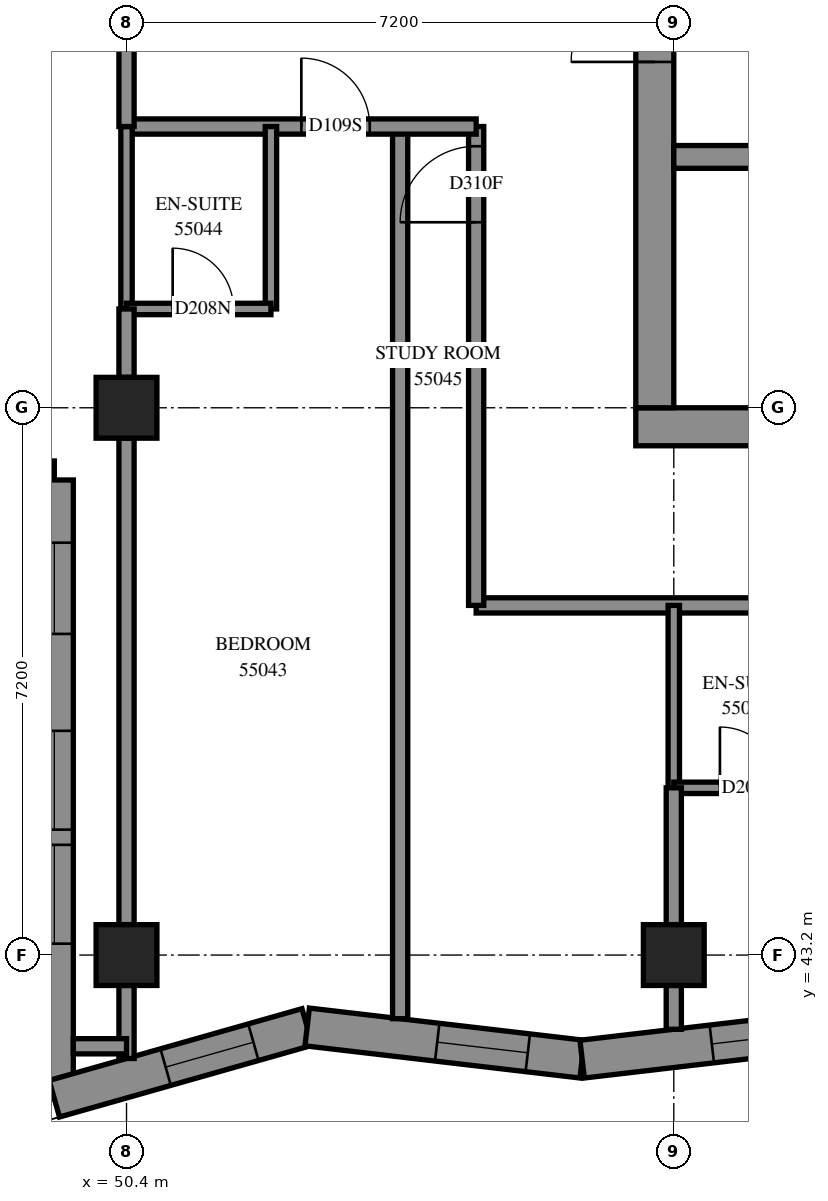
"""IFC4 building model, lengths in metres.
Left out: names, types, materials, properties, quantities, classifications, styles, units other than length and angle.
Written with IfcOpenShell. Run it as: python <this file> out.ifc"""

import sys

from ifc_helpers import new_model, si_unit, direction, frame, frame_2d, origin, origin_2d, place, context, subcontext, project, spatial, polyline, rectangle, outline, extrude, element, fill, save


model = new_model("IFC4")
c1 = context("Model", 3, precision=1e-05, world=origin(), true_north=direction((0.0, 1.0)))
c2 = subcontext(c1, "Body", "Model", "MODEL_VIEW")
j1 = project(units=[si_unit("LENGTHUNIT", "METRE"), si_unit("PLANEANGLEUNIT", "RADIAN")], contexts=[c1])
p1 = place(None, origin())
s1 = spatial("IfcSite", under=j1, at=p1, CompositionType="ELEMENT")
p2 = place(p1, origin())
s2 = spatial("IfcBuilding", under=s1, at=p2, CompositionType="ELEMENT")
p3 = place(p2, frame((0.0, 0.0, 203.2)))
s3 = spatial("IfcBuildingStorey", under=s2, at=p3, CompositionType="ELEMENT", Elevation=203.2)
for number, where, z_axis, x_axis in (
    (1, (50.4, 43.2, 0.0), (0.0, 0.0, 1.0), (1.0, 0.0, 0.0)),
    (2, (50.4, 50.4, 0.0), (0.0, 0.0, 1.0), (1.0, 0.0, 0.0)),
    (3, (57.6, 43.2, 0.0), (0.0, 0.0, 1.0), (1.0, 0.0, 0.0)),
):
    element("IfcColumn", number, at=place(p3, frame(where, z_axis=z_axis, x_axis=x_axis)), inside=s3, PredefinedType="COLUMN", context=c2, shape_type="SweptSolid", body=[
        extrude(rectangle(XDim=0.8, YDim=0.8, at=origin_2d()), origin(), (0.0, 0.0, 1.0), 3.1),
    ])
p4 = place(p3, frame((57.1, 50.15, -0.3), z_axis=(0.0, 0.0, 1.0), x_axis=(1.0, 0.0, 0.0)))
e4 = element("IfcWall", 4, at=p4, inside=s3, PredefinedType="SHEAR", context=c2, shape_type="SweptSolid", body=[
    extrude(rectangle(XDim=15.4, YDim=0.5, at=frame_2d((7.7, 0.0))), origin(), (0.0, 0.0, 1.0), 2.7),
])
p5 = place(p3, frame((57.35, 50.4, -0.3), z_axis=(0.0, 0.0, 1.0), x_axis=(0.0, 1.0, 0.0)))
e5 = element("IfcWall", 5, at=p5, inside=s3, PredefinedType="SHEAR", context=c2, shape_type="SweptSolid", body=[
    extrude(rectangle(XDim=14.4, YDim=0.5, at=frame_2d((7.2, 0.0))), origin(), (0.0, 0.0, 1.0), 2.7),
])
p6 = place(p5, frame((4.55, 0.0, 0.3)))
e6 = element("IfcOpeningElement", 6, at=p6, cuts=e5, PredefinedType="OPENING", context=c2, shape_type="SweptSolid", body=[
    extrude(rectangle(XDim=1.1, YDim=2.1, at=frame_2d((0.55, 1.05))), frame((0.0, 0.26, 0.0), z_axis=(0.0, -1.0, 0.0), x_axis=(1.0, 0.0, 0.0)), (0.0, 0.0, 1.0), 0.52),
])
p7 = place(p5, frame((11.35, 0.0, 0.3)))
e7 = element("IfcOpeningElement", 7, at=p7, cuts=e5, PredefinedType="OPENING", context=c2, shape_type="SweptSolid", body=[
    extrude(rectangle(XDim=1.1, YDim=2.1, at=frame_2d((0.55, 1.05))), frame((0.0, 0.26, 0.0), z_axis=(0.0, -1.0, 0.0), x_axis=(1.0, 0.0, 0.0)), (0.0, 0.0, 1.0), 0.52),
])
p8 = place(p3, frame((57.6, 53.7, 0.0), z_axis=(0.0, 0.0, 1.0), x_axis=(1.0, 0.0, 0.0)))
e8 = element("IfcWall", 8, at=p8, inside=s3, PredefinedType="SOLIDWALL", context=c2, shape_type="SweptSolid", body=[
    extrude(rectangle(XDim=14.4, YDim=0.3, at=frame_2d((7.2, 0.0))), origin(), (0.0, 0.0, 1.0), 3.1),
])
p9 = place(p8, frame((1.35, 0.0, 0.0)))
e9 = element("IfcOpeningElement", 9, at=p9, cuts=e8, PredefinedType="OPENING", context=c2, shape_type="SweptSolid", body=[
    extrude(rectangle(XDim=0.9, YDim=2.1, at=frame_2d((0.45, 1.05))), frame((0.0, 0.16, 0.0), z_axis=(0.0, -1.0, 0.0), x_axis=(1.0, 0.0, 0.0)), (0.0, 0.0, 1.0), 0.32),
])
p10 = place(p8, frame((4.95, 0.0, 0.0)))
e10 = element("IfcOpeningElement", 10, at=p10, cuts=e8, PredefinedType="OPENING", context=c2, shape_type="SweptSolid", body=[
    extrude(rectangle(XDim=0.9, YDim=2.1, at=frame_2d((0.45, 1.05))), frame((0.0, 0.16, 0.0), z_axis=(0.0, -1.0, 0.0), x_axis=(1.0, 0.0, 0.0)), (0.0, 0.0, 1.0), 0.32),
])
p11 = place(p8, frame((8.55, 0.0, 0.0)))
e11 = element("IfcOpeningElement", 11, at=p11, cuts=e8, PredefinedType="OPENING", context=c2, shape_type="SweptSolid", body=[
    extrude(rectangle(XDim=0.9, YDim=2.1, at=frame_2d((0.45, 1.05))), frame((0.0, 0.16, 0.0), z_axis=(0.0, -1.0, 0.0), x_axis=(1.0, 0.0, 0.0)), (0.0, 0.0, 1.0), 0.32),
])
p12 = place(p8, frame((12.05, 0.0, 0.0)))
e12 = element("IfcOpeningElement", 12, at=p12, cuts=e8, PredefinedType="OPENING", context=c2, shape_type="SweptSolid", body=[
    extrude(rectangle(XDim=1.1, YDim=2.1, at=frame_2d((0.55, 1.05))), frame((0.0, 0.16, 0.0), z_axis=(0.0, -1.0, 0.0), x_axis=(1.0, 0.0, 0.0)), (0.0, 0.0, 1.0), 0.32),
])
p13 = place(p3, frame((42.25, 49.45, 0.0), z_axis=(0.0, 0.0, 1.0), x_axis=(1.0, 0.0, 0.0)))
e13 = element("IfcWall", 13, at=p13, inside=s3, PredefinedType="SOLIDWALL", context=c2, shape_type="SweptSolid", body=[
    extrude(outline(polyline([(-0.25, -0.25), (6.95, -0.25), (7.45, 0.25), (0.25, 0.25), (-0.25, -0.25)])), origin(), (0.0, 0.0, 1.0), 3.1),
])
p14 = place(p13, frame((1.35, 0.0, 0.45)))
e14 = element("IfcOpeningElement", 14, at=p14, cuts=e13, PredefinedType="OPENING", context=c2, shape_type="SweptSolid", body=[
    extrude(rectangle(XDim=1.3, YDim=2.5, at=frame_2d((0.65, 1.25))), frame((0.0, 0.26, 0.0), z_axis=(0.0, -1.0, 0.0), x_axis=(1.0, 0.0, 0.0)), (0.0, 0.0, 1.0), 0.52),
])
p15 = place(p13, frame((2.85, 0.0, 0.45)))
e15 = element("IfcOpeningElement", 15, at=p15, cuts=e13, PredefinedType="OPENING", context=c2, shape_type="SweptSolid", body=[
    extrude(rectangle(XDim=1.3, YDim=2.5, at=frame_2d((0.65, 1.25))), frame((0.0, 0.26, 0.0), z_axis=(0.0, -1.0, 0.0), x_axis=(1.0, 0.0, 0.0)), (0.0, 0.0, 1.0), 0.52),
])
p16 = place(p13, frame((5.175, 0.0, 0.45)))
e16 = element("IfcOpeningElement", 16, at=p16, cuts=e13, PredefinedType="OPENING", context=c2, shape_type="SweptSolid", body=[
    extrude(rectangle(XDim=1.2, YDim=2.5, at=frame_2d((0.6, 1.25))), frame((0.0, 0.26, 0.0), z_axis=(0.0, -1.0, 0.0), x_axis=(1.0, 0.0, 0.0)), (0.0, 0.0, 1.0), 0.52),
])
p17 = place(p3, frame((49.45, 49.45, 0.0), z_axis=(0.0, 0.0, 1.0), x_axis=(0.0, -1.0, 0.0)))
e17 = element("IfcWall", 17, at=p17, inside=s3, PredefinedType="SOLIDWALL", context=c2, shape_type="SweptSolid", body=[
    extrude(outline(polyline([(0.25, -0.25), (8.471, -0.25), (7.809, 0.25), (-0.25, 0.25), (0.25, -0.25)])), origin(), (0.0, 0.0, 1.0), 3.1),
])
p18 = place(p17, frame((3.3, 0.0, 0.45)))
e18 = element("IfcOpeningElement", 18, at=p18, cuts=e17, PredefinedType="OPENING", context=c2, shape_type="SweptSolid", body=[
    extrude(rectangle(XDim=1.3, YDim=2.5, at=frame_2d((0.65, 1.25))), frame((0.0, 0.26, 0.0), z_axis=(0.0, -1.0, 0.0), x_axis=(1.0, 0.0, 0.0)), (0.0, 0.0, 1.0), 0.52),
])
p19 = place(p17, frame((4.8, 0.0, 0.45)))
e19 = element("IfcOpeningElement", 19, at=p19, cuts=e17, PredefinedType="OPENING", context=c2, shape_type="SweptSolid", body=[
    extrude(rectangle(XDim=1.3, YDim=2.5, at=frame_2d((0.65, 1.25))), frame((0.0, 0.26, 0.0), z_axis=(0.0, -1.0, 0.0), x_axis=(1.0, 0.0, 0.0)), (0.0, 0.0, 1.0), 0.52),
])
p20 = place(p17, frame((0.825, 0.0, 0.45)))
e20 = element("IfcOpeningElement", 20, at=p20, cuts=e17, PredefinedType="OPENING", context=c2, shape_type="SweptSolid", body=[
    extrude(rectangle(XDim=1.2, YDim=2.5, at=frame_2d((0.6, 1.25))), frame((0.0, 0.26, 0.0), z_axis=(0.0, -1.0, 0.0), x_axis=(1.0, 0.0, 0.0)), (0.0, 0.0, 1.0), 0.52),
])
p21 = place(p3, frame((49.45, 41.31, 0.0), z_axis=(0.0, 0.0, 1.0), x_axis=(0.9619950248, 0.2730669739, 0.0)))
e21 = element("IfcWall", 21, at=p21, inside=s3, PredefinedType="SOLIDWALL", context=c2, shape_type="SweptSolid", body=[
    extrude(outline(polyline([(-0.331, -0.25), (3.408, -0.25), (3.508, 0.25), (0.331, 0.25), (-0.331, -0.25)])), origin(), (0.0, 0.0, 1.0), 3.1),
])
p22 = place(p21, frame((1.523, 0.0, 0.45)))
e22 = element("IfcOpeningElement", 22, at=p22, cuts=e21, PredefinedType="OPENING", context=c2, shape_type="SweptSolid", body=[
    extrude(rectangle(XDim=1.2, YDim=2.5, at=frame_2d((0.6, 1.25))), frame((0.0, 0.26, 0.0), z_axis=(0.0, -1.0, 0.0), x_axis=(1.0, 0.0, 0.0)), (0.0, 0.0, 1.0), 0.52),
])
p23 = place(p3, frame((52.777, 42.254, 0.0), z_axis=(0.0, 0.0, 1.0), x_axis=(0.9932201451, -0.1162486273, 0.0)))
e23 = element("IfcWall", 23, at=p23, inside=s3, PredefinedType="SOLIDWALL", context=c2, shape_type="SweptSolid", body=[
    extrude(outline(polyline([(0.05, -0.25), (3.671, -0.25), (3.613, 0.25), (-0.05, 0.25), (0.05, -0.25)])), origin(), (0.0, 0.0, 1.0), 3.1),
])
p24 = place(p23, frame((1.722, 0.0, 0.45)))
e24 = element("IfcOpeningElement", 24, at=p24, cuts=e23, PredefinedType="OPENING", context=c2, shape_type="SweptSolid", body=[
    extrude(rectangle(XDim=1.2, YDim=2.5, at=frame_2d((0.6, 1.25))), frame((0.0, 0.26, 0.0), z_axis=(0.0, -1.0, 0.0), x_axis=(1.0, 0.0, 0.0)), (0.0, 0.0, 1.0), 0.52),
])
p25 = place(p3, frame((56.394, 41.831, 0.0), z_axis=(0.0, 0.0, 1.0), x_axis=(0.9932205385, 0.1162452661, 0.0)))
e25 = element("IfcWall", 25, at=p25, inside=s3, PredefinedType="SOLIDWALL", context=c2, shape_type="SweptSolid", body=[
    extrude(outline(polyline([(-0.029, -0.25), (3.592, -0.25), (3.651, 0.25), (0.029, 0.25), (-0.029, -0.25)])), origin(), (0.0, 0.0, 1.0), 3.1),
])
p26 = place(p25, frame((1.718, 0.0, 0.45)))
e26 = element("IfcOpeningElement", 26, at=p26, cuts=e25, PredefinedType="OPENING", context=c2, shape_type="SweptSolid", body=[
    extrude(rectangle(XDim=1.2, YDim=2.5, at=frame_2d((0.6, 1.25))), frame((0.0, 0.26, 0.0), z_axis=(0.0, -1.0, 0.0), x_axis=(1.0, 0.0, 0.0)), (0.0, 0.0, 1.0), 0.52),
])
p27 = place(p3, frame((55.0, 47.8, 0.0), z_axis=(0.0, 0.0, 1.0), x_axis=(1.0, 0.0, 0.0)))
e27 = element("IfcWall", 27, at=p27, inside=s3, PredefinedType="PARTITIONING", context=c2, shape_type="SweptSolid", body=[
    extrude(rectangle(XDim=19.266, YDim=0.2, at=frame_2d((9.633, 0.0))), origin(), (0.0, 0.0, 1.0), 3.1),
])
p28 = place(p27, frame((4.9, 0.0, 0.0)))
e28 = element("IfcOpeningElement", 28, at=p28, cuts=e27, PredefinedType="OPENING", context=c2, shape_type="SweptSolid", body=[
    extrude(rectangle(XDim=0.9, YDim=2.1, at=frame_2d((0.45, 1.05))), frame((0.0, 0.11, 0.0), z_axis=(0.0, -1.0, 0.0), x_axis=(1.0, 0.0, 0.0)), (0.0, 0.0, 1.0), 0.22),
])
p29 = place(p27, frame((6.6, 0.0, 0.0)))
e29 = element("IfcOpeningElement", 29, at=p29, cuts=e27, PredefinedType="OPENING", context=c2, shape_type="SweptSolid", body=[
    extrude(rectangle(XDim=0.9, YDim=2.1, at=frame_2d((0.45, 1.05))), frame((0.0, 0.11, 0.0), z_axis=(0.0, -1.0, 0.0), x_axis=(1.0, 0.0, 0.0)), (0.0, 0.0, 1.0), 0.22),
])
p30 = place(p27, frame((13.743, 0.0, 0.0)))
e30 = element("IfcOpeningElement", 30, at=p30, cuts=e27, PredefinedType="OPENING", context=c2, shape_type="SweptSolid", body=[
    extrude(rectangle(XDim=0.9, YDim=2.1, at=frame_2d((0.45, 1.05))), frame((0.0, 0.11, 0.0), z_axis=(0.0, -1.0, 0.0), x_axis=(1.0, 0.0, 0.0)), (0.0, 0.0, 1.0), 0.22),
])
p31 = place(p3, frame((54.0, 42.363, 0.0), z_axis=(0.0, 0.0, 1.0), x_axis=(0.0, 1.0, 0.0)))
e31 = element("IfcWall", 31, at=p31, inside=s3, PredefinedType="PARTITIONING", context=c2, shape_type="SweptSolid", body=[
    extrude(rectangle(XDim=11.737, YDim=0.2, at=frame_2d((5.869, 0.0))), origin(), (0.0, 0.0, 1.0), 3.1),
])
p32 = place(p3, frame((50.4, 43.6, 0.0), z_axis=(0.0, 0.0, 1.0), x_axis=(0.0, 1.0, 0.0)))
e32 = element("IfcWall", 32, at=p32, inside=s3, PredefinedType="PARTITIONING", context=c2, shape_type="SweptSolid", body=[
    extrude(rectangle(XDim=6.4, YDim=0.2, at=frame_2d((3.2, 0.0))), origin(), (0.0, 0.0, 1.0), 2.6),
])
p33 = place(p3, frame((55.0, 47.8, 0.0), z_axis=(0.0, 0.0, 1.0), x_axis=(0.0, 1.0, 0.0)))
e33 = element("IfcWall", 33, at=p33, inside=s3, PredefinedType="PARTITIONING", context=c2, shape_type="SweptSolid", body=[
    extrude(rectangle(XDim=6.3, YDim=0.2, at=frame_2d((3.15, 0.0))), origin(), (0.0, 0.0, 1.0), 3.1),
])
p34 = place(p33, frame((5.041, 0.0, 0.0)))
e34 = element("IfcOpeningElement", 34, at=p34, cuts=e33, PredefinedType="OPENING", context=c2, shape_type="SweptSolid", body=[
    extrude(rectangle(XDim=1.0, YDim=2.1, at=frame_2d((0.5, 1.05))), frame((0.0, 0.11, 0.0), z_axis=(0.0, -1.0, 0.0), x_axis=(1.0, 0.0, 0.0)), (0.0, 0.0, 1.0), 0.22),
])
p35 = place(p3, frame((50.4, 54.1, 0.0), z_axis=(0.0, 0.0, 1.0), x_axis=(1.0, 0.0, 0.0)))
e35 = element("IfcWall", 35, at=p35, inside=s3, PredefinedType="PARTITIONING", context=c2, shape_type="SweptSolid", body=[
    extrude(rectangle(XDim=4.6, YDim=0.2, at=frame_2d((2.3, 0.0))), origin(), (0.0, 0.0, 1.0), 3.1),
])
p36 = place(p35, frame((2.3, 0.0, 0.0)))
e36 = element("IfcOpeningElement", 36, at=p36, cuts=e35, PredefinedType="OPENING", context=c2, shape_type="SweptSolid", body=[
    extrude(rectangle(XDim=0.9, YDim=2.1, at=frame_2d((0.45, 1.05))), frame((0.0, 0.11, 0.0), z_axis=(0.0, -1.0, 0.0), x_axis=(1.0, 0.0, 0.0)), (0.0, 0.0, 1.0), 0.22),
])
for number, where, z_axis, x_axis in (
    (37, (52.3, 51.7, 0.0), (0.0, 0.0, 1.0), (0.0, 1.0, 0.0)),
    (38, (50.4, 51.7, 0.0), (0.0, 0.0, 1.0), (0.0, 1.0, 0.0)),
    (39, (57.6, 45.4, 0.0), (0.0, 0.0, 1.0), (0.0, 1.0, 0.0)),
):
    element("IfcWall", number, at=place(p3, frame(where, z_axis=z_axis, x_axis=x_axis)), inside=s3, PredefinedType="PARTITIONING", context=c2, shape_type="SweptSolid", body=[
        extrude(rectangle(XDim=2.4, YDim=0.15, at=frame_2d((1.2, 0.0))), origin(), (0.0, 0.0, 1.0), 3.1),
    ])
p37 = place(p3, frame((50.4, 54.1, 0.0), z_axis=(0.0, 0.0, 1.0), x_axis=(0.0, 1.0, 0.0)))
e40 = element("IfcWall", 40, at=p37, inside=s3, PredefinedType="PARTITIONING", context=c2, shape_type="SweptSolid", body=[
    extrude(rectangle(XDim=2.2, YDim=0.2, at=frame_2d((1.1, 0.0))), origin(), (0.0, 0.0, 1.0), 3.1),
])
p38 = place(p3, frame((50.4, 51.7, 0.0), z_axis=(0.0, 0.0, 1.0), x_axis=(1.0, 0.0, 0.0)))
e41 = element("IfcWall", 41, at=p38, inside=s3, PredefinedType="PARTITIONING", context=c2, shape_type="SweptSolid", body=[
    extrude(rectangle(XDim=1.9, YDim=0.15, at=frame_2d((0.95, 0.0))), origin(), (0.0, 0.0, 1.0), 3.1),
])
p39 = place(p38, frame((0.607, 0.0, 0.0)))
e42 = element("IfcOpeningElement", 42, at=p39, cuts=e41, PredefinedType="OPENING", context=c2, shape_type="SweptSolid", body=[
    extrude(rectangle(XDim=0.8, YDim=2.1, at=frame_2d((0.4, 1.05))), frame((0.0, 0.085, 0.0), z_axis=(0.0, -1.0, 0.0), x_axis=(1.0, 0.0, 0.0)), (0.0, 0.0, 1.0), 0.17),
])
p40 = place(p3, frame((57.6, 45.4, 0.0), z_axis=(0.0, 0.0, 1.0), x_axis=(1.0, 0.0, 0.0)))
e43 = element("IfcWall", 43, at=p40, inside=s3, PredefinedType="PARTITIONING", context=c2, shape_type="SweptSolid", body=[
    extrude(rectangle(XDim=1.9, YDim=0.15, at=frame_2d((0.95, 0.0))), origin(), (0.0, 0.0, 1.0), 3.1),
])
p41 = place(p40, frame((0.607, 0.0, 0.0)))
e44 = element("IfcOpeningElement", 44, at=p41, cuts=e43, PredefinedType="OPENING", context=c2, shape_type="SweptSolid", body=[
    extrude(rectangle(XDim=0.8, YDim=2.1, at=frame_2d((0.4, 1.05))), frame((0.0, 0.085, 0.0), z_axis=(0.0, -1.0, 0.0), x_axis=(1.0, 0.0, 0.0)), (0.0, 0.0, 1.0), 0.17),
])
p42 = place(p3, frame((57.6, 43.6, 0.0), z_axis=(0.0, 0.0, 1.0), x_axis=(0.0, 1.0, 0.0)))
e45 = element("IfcWall", 45, at=p42, inside=s3, PredefinedType="PARTITIONING", context=c2, shape_type="SweptSolid", body=[
    extrude(rectangle(XDim=1.8, YDim=0.2, at=frame_2d((0.9, 0.0))), origin(), (0.0, 0.0, 1.0), 3.1),
])
p43 = place(p3, frame((50.4, 50.8, 0.0), z_axis=(0.0, 0.0, 1.0), x_axis=(0.0, 1.0, 0.0)))
e46 = element("IfcWall", 46, at=p43, inside=s3, PredefinedType="PARTITIONING", context=c2, shape_type="SweptSolid", body=[
    extrude(rectangle(XDim=0.9, YDim=0.2, at=frame_2d((0.45, 0.0))), origin(), (0.0, 0.0, 1.0), 3.1),
])
p44 = place(p3, frame((50.4, 41.839, 0.0), z_axis=(0.0, 0.0, 1.0), x_axis=(0.0, 1.0, 0.0)))
e47 = element("IfcWall", 47, at=p44, inside=s3, PredefinedType="PARTITIONING", context=c2, shape_type="SweptSolid", body=[
    extrude(rectangle(XDim=0.961, YDim=0.2, at=frame_2d((0.48, 0.0))), origin(), (0.0, 0.0, 1.0), 3.1),
])
p45 = place(p3, frame((49.7, 42.0, 0.0), z_axis=(0.0, 0.0, 1.0), x_axis=(1.0, 0.0, 0.0)))
e48 = element("IfcWall", 48, at=p45, inside=s3, PredefinedType="PARTITIONING", context=c2, shape_type="SweptSolid", body=[
    extrude(rectangle(XDim=0.7, YDim=0.2, at=frame_2d((0.35, 0.0))), origin(), (0.0, 0.0, 1.0), 3.1),
])
p46 = place(p3, frame((57.6, 42.224, 0.0), z_axis=(0.0, 0.0, 1.0), x_axis=(0.0, 1.0, 0.0)))
e49 = element("IfcWall", 49, at=p46, inside=s3, PredefinedType="PARTITIONING", context=c2, shape_type="SweptSolid", body=[
    extrude(rectangle(XDim=0.577, YDim=0.2, at=frame_2d((0.288, 0.0))), origin(), (0.0, 0.0, 1.0), 3.1),
])
p47 = place(p18, origin())
e50 = element("IfcWindow", 50, at=p47, inside=s3, PartitioningType="SINGLE_PANEL", PredefinedType="WINDOW", context=c2, shape_type="SweptSolid", body=[
    extrude(rectangle(XDim=1.3, YDim=2.5, at=frame_2d((0.65, 1.25))), frame((0.0, 0.18, 0.0), z_axis=(0.0, -1.0, 0.0), x_axis=(1.0, 0.0, 0.0)), (0.0, 0.0, 1.0), 0.06),
])
fill(e18, e50)
p48 = place(p19, origin())
e51 = element("IfcWindow", 51, at=p48, inside=s3, PartitioningType="SINGLE_PANEL", PredefinedType="WINDOW", context=c2, shape_type="SweptSolid", body=[
    extrude(rectangle(XDim=1.3, YDim=2.5, at=frame_2d((0.65, 1.25))), frame((0.0, 0.18, 0.0), z_axis=(0.0, -1.0, 0.0), x_axis=(1.0, 0.0, 0.0)), (0.0, 0.0, 1.0), 0.06),
])
fill(e19, e51)
p49 = place(p20, origin())
e52 = element("IfcWindow", 52, at=p49, inside=s3, PartitioningType="SINGLE_PANEL", PredefinedType="WINDOW", context=c2, shape_type="SweptSolid", body=[
    extrude(rectangle(XDim=1.2, YDim=2.5, at=frame_2d((0.6, 1.25))), frame((0.0, 0.18, 0.0), z_axis=(0.0, -1.0, 0.0), x_axis=(1.0, 0.0, 0.0)), (0.0, 0.0, 1.0), 0.06),
])
fill(e20, e52)
p50 = place(p22, origin())
e53 = element("IfcWindow", 53, at=p50, inside=s3, PartitioningType="SINGLE_PANEL", PredefinedType="WINDOW", context=c2, shape_type="SweptSolid", body=[
    extrude(rectangle(XDim=1.2, YDim=2.5, at=frame_2d((0.6, 1.25))), frame((0.0, 0.18, 0.0), z_axis=(0.0, -1.0, 0.0), x_axis=(1.0, 0.0, 0.0)), (0.0, 0.0, 1.0), 0.06),
])
fill(e22, e53)
p51 = place(p24, origin())
e54 = element("IfcWindow", 54, at=p51, inside=s3, PartitioningType="SINGLE_PANEL", PredefinedType="WINDOW", context=c2, shape_type="SweptSolid", body=[
    extrude(rectangle(XDim=1.2, YDim=2.5, at=frame_2d((0.6, 1.25))), frame((0.0, 0.18, 0.0), z_axis=(0.0, -1.0, 0.0), x_axis=(1.0, 0.0, 0.0)), (0.0, 0.0, 1.0), 0.06),
])
fill(e24, e54)
p52 = place(p26, origin())
e55 = element("IfcWindow", 55, at=p52, inside=s3, PartitioningType="SINGLE_PANEL", PredefinedType="WINDOW", context=c2, shape_type="SweptSolid", body=[
    extrude(rectangle(XDim=1.2, YDim=2.5, at=frame_2d((0.6, 1.25))), frame((0.0, 0.18, 0.0), z_axis=(0.0, -1.0, 0.0), x_axis=(1.0, 0.0, 0.0)), (0.0, 0.0, 1.0), 0.06),
])
fill(e26, e55)
p53 = place(p6, origin())
e56 = element("IfcDoor", 56, at=p53, inside=s3, OperationType="DOUBLE_DOOR_SINGLE_SWING", PredefinedType="DOOR", context=c2, shape_type="SweptSolid", body=[
    extrude(rectangle(XDim=1.1, YDim=2.1, at=frame_2d((0.55, 1.05))), frame((0.0, 0.025, 0.0), z_axis=(0.0, -1.0, 0.0), x_axis=(1.0, 0.0, 0.0)), (0.0, 0.0, 1.0), 0.05),
])
fill(e6, e56)
p54 = place(p36, origin())
e57 = element("IfcDoor", 57, at=p54, inside=s3, OperationType="SINGLE_SWING_LEFT", PredefinedType="DOOR", context=c2, shape_type="SweptSolid", body=[
    extrude(rectangle(XDim=0.9, YDim=2.1, at=frame_2d((0.45, 1.05))), frame((0.0, 0.025, 0.0), z_axis=(0.0, -1.0, 0.0), x_axis=(1.0, 0.0, 0.0)), (0.0, 0.0, 1.0), 0.05),
])
fill(e36, e57)
p55 = place(p39, origin())
e58 = element("IfcDoor", 58, at=p55, inside=s3, OperationType="SINGLE_SWING_RIGHT", PredefinedType="DOOR", context=c2, shape_type="SweptSolid", body=[
    extrude(rectangle(XDim=0.8, YDim=2.1, at=frame_2d((0.4, 1.05))), frame((0.0, 0.025, 0.0), z_axis=(0.0, -1.0, 0.0), x_axis=(1.0, 0.0, 0.0)), (0.0, 0.0, 1.0), 0.05),
])
fill(e42, e58)
p56 = place(p34, origin())
e59 = element("IfcDoor", 59, at=p56, inside=s3, OperationType="SINGLE_SWING_RIGHT", PredefinedType="DOOR", context=c2, shape_type="SweptSolid", body=[
    extrude(rectangle(XDim=1.0, YDim=2.1, at=frame_2d((0.5, 1.05))), frame((0.0, 0.025, 0.0), z_axis=(0.0, -1.0, 0.0), x_axis=(1.0, 0.0, 0.0)), (0.0, 0.0, 1.0), 0.05),
])
fill(e34, e59)
p57 = place(p41, origin())
e60 = element("IfcDoor", 60, at=p57, inside=s3, OperationType="SINGLE_SWING_RIGHT", PredefinedType="DOOR", context=c2, shape_type="SweptSolid", body=[
    extrude(rectangle(XDim=0.8, YDim=2.1, at=frame_2d((0.4, 1.05))), frame((0.0, 0.025, 0.0), z_axis=(0.0, -1.0, 0.0), x_axis=(1.0, 0.0, 0.0)), (0.0, 0.0, 1.0), 0.05),
])
fill(e44, e60)
save(model, sys.argv[1])
